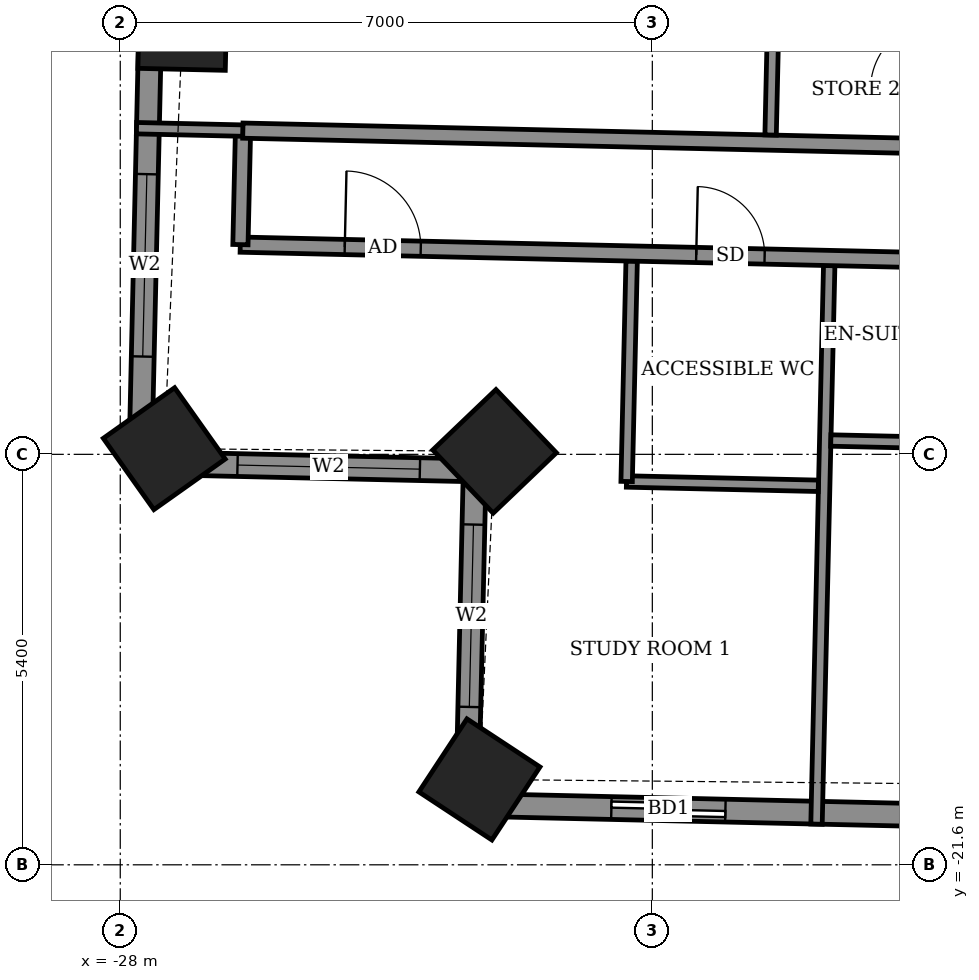
"""IFC4 building model, lengths in metres.
Left out: names, types, materials, properties, quantities, classifications, styles, units other than length and angle.
Written with IfcOpenShell. Run it as: python <this file> out.ifc"""

import sys

from ifc_helpers import new_model, si_unit, direction, frame, frame_2d, origin, origin_2d, place, context, subcontext, project, spatial, rectangle, extrude, element, fill, save


model = new_model("IFC4")
c1 = context("Model", 3, precision=1e-05, world=origin(), true_north=direction((0.0, 1.0)))
c2 = subcontext(c1, "Body", "Model", "MODEL_VIEW")
j1 = project(units=[si_unit("LENGTHUNIT", "METRE"), si_unit("PLANEANGLEUNIT", "RADIAN")], contexts=[c1])
p1 = place(None, origin())
s1 = spatial("IfcSite", under=j1, at=p1, CompositionType="ELEMENT")
p2 = place(p1, origin())
s2 = spatial("IfcBuilding", under=s1, at=p2, CompositionType="ELEMENT")
p3 = place(p2, frame((0.0, 0.0, 205.1)))
s3 = spatial("IfcBuildingStorey", under=s2, at=p3, CompositionType="ELEMENT", Elevation=205.1)
for number, where, z_axis, x_axis in (
    (1, (-27.18, -10.56, -0.55), (0.0, 0.0, 1.0), (-0.023, -1.0, 0.0)),
    (2, (-27.421, -16.125, -0.55), (0.0, 0.0, 1.0), (0.579, -0.816, 0.0)),
    (3, (-23.075, -16.161, -0.55), (0.0, 0.0, 1.0), (0.691, -0.723, 0.0)),
    (4, (-23.275, -20.477, -0.55), (0.0, 0.0, 1.0), (0.835, -0.55, 0.0)),
):
    element("IfcColumn", number, at=place(p3, frame(where, z_axis=z_axis, x_axis=x_axis)), inside=s3, PredefinedType="COLUMN", context=c2, shape_type="SweptSolid", body=[
        extrude(rectangle(XDim=1.15, YDim=1.15, at=origin_2d()), origin(), (0.0, 0.0, 1.0), 3.6),
    ])
p4 = place(p3, frame((-27.459, -4.091, 0.0), z_axis=(0.0, 0.0, 1.0), x_axis=(-0.022668325129, -0.999743040504, 0.0)))
e5 = element("IfcWall", 5, at=p4, inside=s3, PredefinedType="SOLIDWALL", context=c2, shape_type="SweptSolid", body=[
    extrude(rectangle(XDim=12.224, YDim=0.3, at=frame_2d((6.112, 0.0))), origin(), (0.0, 0.0, 1.0), 2.55),
])
p5 = place(p4, frame((2.756, 0.0, 0.0)))
e6 = element("IfcOpeningElement", 6, at=p5, cuts=e5, PredefinedType="OPENING", context=c2, shape_type="SweptSolid", body=[
    extrude(rectangle(XDim=1.5, YDim=2.4, at=frame_2d((0.75, 1.2))), frame((0.0, 0.16, 0.0), z_axis=(0.0, -1.0, 0.0), x_axis=(1.0, 0.0, 0.0)), (0.0, 0.0, 1.0), 0.32),
])
p6 = place(p4, frame((8.425, 0.0, 0.9)))
e7 = element("IfcOpeningElement", 7, at=p6, cuts=e5, PredefinedType="OPENING", context=c2, shape_type="SweptSolid", body=[
    extrude(rectangle(XDim=2.4, YDim=1.5, at=frame_2d((1.2, 0.75))), frame((0.0, 0.16, 0.0), z_axis=(0.0, -1.0, 0.0), x_axis=(1.0, 0.0, 0.0)), (0.0, 0.0, 1.0), 0.32),
])
p7 = place(p3, frame((-27.736, -16.312, 0.0), z_axis=(0.0, 0.0, 1.0), x_axis=(0.999747504193, -0.022470599878, 0.0)))
e8 = element("IfcWall", 8, at=p7, inside=s3, PredefinedType="SOLIDWALL", context=c2, shape_type="SweptSolid", body=[
    extrude(rectangle(XDim=4.4, YDim=0.3, at=frame_2d((2.2, 0.0))), origin(), (0.0, 0.0, 1.0), 2.55),
])
p8 = place(p7, frame((1.279, 0.0, 0.9)))
e9 = element("IfcOpeningElement", 9, at=p8, cuts=e8, PredefinedType="OPENING", context=c2, shape_type="SweptSolid", body=[
    extrude(rectangle(XDim=2.4, YDim=1.5, at=frame_2d((1.2, 0.75))), frame((0.0, 0.16, 0.0), z_axis=(0.0, -1.0, 0.0), x_axis=(1.0, 0.0, 0.0)), (0.0, 0.0, 1.0), 0.32),
])
p9 = place(p3, frame((-23.337, -16.411, 0.0), z_axis=(0.0, 0.0, 1.0), x_axis=(-0.022747872013, -0.999741233679, 0.0)))
e10 = element("IfcWall", 10, at=p9, inside=s3, PredefinedType="SOLIDWALL", context=c2, shape_type="SweptSolid", body=[
    extrude(rectangle(XDim=4.4, YDim=0.3, at=frame_2d((2.2, 0.0))), origin(), (0.0, 0.0, 1.0), 2.55),
])
p10 = place(p9, frame((0.713, 0.0, 0.9)))
e11 = element("IfcOpeningElement", 11, at=p10, cuts=e10, PredefinedType="OPENING", context=c2, shape_type="SweptSolid", body=[
    extrude(rectangle(XDim=2.4, YDim=1.5, at=frame_2d((1.2, 0.75))), frame((0.0, 0.16, 0.0), z_axis=(0.0, -1.0, 0.0), x_axis=(1.0, 0.0, 0.0)), (0.0, 0.0, 1.0), 0.32),
])
p11 = place(p3, frame((-23.437, -20.81, 0.0), z_axis=(0.0, 0.0, 1.0), x_axis=(0.999742269115, -0.022702320244, 0.0)))
e12 = element("IfcWall", 12, at=p11, inside=s3, PredefinedType="SOLIDWALL", context=c2, shape_type="SweptSolid", body=[
    extrude(rectangle(XDim=41.844, YDim=0.3, at=frame_2d((20.922, 0.0))), origin(), (0.0, 0.0, 1.0), 2.55),
])
p12 = place(p11, frame((1.899, 0.0, 0.0)))
e13 = element("IfcOpeningElement", 13, at=p12, cuts=e12, PredefinedType="OPENING", context=c2, shape_type="SweptSolid", body=[
    extrude(rectangle(XDim=1.5, YDim=2.4, at=frame_2d((0.75, 1.2))), frame((0.0, 0.16, 0.0), z_axis=(0.0, -1.0, 0.0), x_axis=(1.0, 0.0, 0.0)), (0.0, 0.0, 1.0), 0.32),
])
p13 = place(p11, frame((7.575, 0.0, 0.0)))
e14 = element("IfcOpeningElement", 14, at=p13, cuts=e12, PredefinedType="OPENING", context=c2, shape_type="SweptSolid", body=[
    extrude(rectangle(XDim=1.2, YDim=2.4, at=frame_2d((0.6, 1.2))), frame((0.0, 0.16, 0.0), z_axis=(0.0, -1.0, 0.0), x_axis=(1.0, 0.0, 0.0)), (0.0, 0.0, 1.0), 0.32),
])
p14 = place(p11, frame((10.612, 0.0, 0.0)))
e15 = element("IfcOpeningElement", 15, at=p14, cuts=e12, PredefinedType="OPENING", context=c2, shape_type="SweptSolid", body=[
    extrude(rectangle(XDim=1.5, YDim=2.4, at=frame_2d((0.75, 1.2))), frame((0.0, 0.16, 0.0), z_axis=(0.0, -1.0, 0.0), x_axis=(1.0, 0.0, 0.0)), (0.0, 0.0, 1.0), 0.32),
])
p15 = place(p11, frame((15.762, 0.0, 0.0)))
e16 = element("IfcOpeningElement", 16, at=p15, cuts=e12, PredefinedType="OPENING", context=c2, shape_type="SweptSolid", body=[
    extrude(rectangle(XDim=1.5, YDim=2.4, at=frame_2d((0.75, 1.2))), frame((0.0, 0.16, 0.0), z_axis=(0.0, -1.0, 0.0), x_axis=(1.0, 0.0, 0.0)), (0.0, 0.0, 1.0), 0.32),
])
p16 = place(p11, frame((21.648, 0.0, 0.0)))
e17 = element("IfcOpeningElement", 17, at=p16, cuts=e12, PredefinedType="OPENING", context=c2, shape_type="SweptSolid", body=[
    extrude(rectangle(XDim=1.2, YDim=2.4, at=frame_2d((0.6, 1.2))), frame((0.0, 0.16, 0.0), z_axis=(0.0, -1.0, 0.0), x_axis=(1.0, 0.0, 0.0)), (0.0, 0.0, 1.0), 0.32),
])
p17 = place(p11, frame((24.685, 0.0, 0.0)))
e18 = element("IfcOpeningElement", 18, at=p17, cuts=e12, PredefinedType="OPENING", context=c2, shape_type="SweptSolid", body=[
    extrude(rectangle(XDim=1.5, YDim=2.4, at=frame_2d((0.75, 1.2))), frame((0.0, 0.16, 0.0), z_axis=(0.0, -1.0, 0.0), x_axis=(1.0, 0.0, 0.0)), (0.0, 0.0, 1.0), 0.32),
])
p18 = place(p11, frame((29.685, 0.0, 0.0)))
e19 = element("IfcOpeningElement", 19, at=p18, cuts=e12, PredefinedType="OPENING", context=c2, shape_type="SweptSolid", body=[
    extrude(rectangle(XDim=1.5, YDim=2.4, at=frame_2d((0.75, 1.2))), frame((0.0, 0.16, 0.0), z_axis=(0.0, -1.0, 0.0), x_axis=(1.0, 0.0, 0.0)), (0.0, 0.0, 1.0), 0.32),
])
p19 = place(p11, frame((33.022, 0.0, 0.0)))
e20 = element("IfcOpeningElement", 20, at=p19, cuts=e12, PredefinedType="OPENING", context=c2, shape_type="SweptSolid", body=[
    extrude(rectangle(XDim=1.2, YDim=2.4, at=frame_2d((0.6, 1.2))), frame((0.0, 0.16, 0.0), z_axis=(0.0, -1.0, 0.0), x_axis=(1.0, 0.0, 0.0)), (0.0, 0.0, 1.0), 0.32),
])
p20 = place(p11, frame((37.974, 0.0, 0.9)))
e21 = element("IfcOpeningElement", 21, at=p20, cuts=e12, PredefinedType="OPENING", context=c2, shape_type="SweptSolid", body=[
    extrude(rectangle(XDim=2.4, YDim=1.5, at=frame_2d((1.2, 0.75))), frame((0.0, 0.16, 0.0), z_axis=(0.0, -1.0, 0.0), x_axis=(1.0, 0.0, 0.0)), (0.0, 0.0, 1.0), 0.32),
])
p21 = place(p3, frame((-18.84, -21.065, 0.0), z_axis=(0.0, 0.0, 1.0), x_axis=(0.022720650804, 0.999741852694, 0.0)))
e22 = element("IfcWall", 22, at=p21, inside=s3, PredefinedType="PARTITIONING", context=c2, shape_type="SweptSolid", body=[
    extrude(rectangle(XDim=7.35, YDim=0.15, at=frame_2d((3.675, 0.0))), origin(), (0.0, 0.0, 1.0), 2.55),
])
p22 = place(p3, frame((-21.34, -16.557, 0.0), z_axis=(0.0, 0.0, 1.0), x_axis=(0.999743977673, -0.022626955293, 0.0)))
e23 = element("IfcWall", 23, at=p22, inside=s3, PredefinedType="PARTITIONING", context=c2, shape_type="SweptSolid", body=[
    extrude(rectangle(XDim=2.525, YDim=0.15, at=frame_2d((1.262, 0.0))), origin(), (0.0, 0.0, 1.0), 3.05),
])
p23 = place(p3, frame((-21.338, -16.557, 0.0), z_axis=(0.0, 0.0, 1.0), x_axis=(0.022732880677, 0.999741574676, 0.0)))
e24 = element("IfcWall", 24, at=p23, inside=s3, PredefinedType="PARTITIONING", context=c2, shape_type="SweptSolid", body=[
    extrude(rectangle(XDim=2.9, YDim=0.15, at=frame_2d((1.45, 0.0))), origin(), (0.0, 0.0, 1.0), 3.05),
])
p24 = place(p3, frame((-18.652, -16.018, 0.0), z_axis=(0.0, 0.0, 1.0), x_axis=(0.999749797124, -0.022368351553, 0.0)))
e25 = element("IfcWall", 25, at=p24, inside=s3, PredefinedType="PARTITIONING", context=c2, shape_type="SweptSolid", body=[
    extrude(rectangle(XDim=2.325, YDim=0.15, at=frame_2d((1.162, 0.0))), origin(), (0.0, 0.0, 1.0), 3.05),
])
p25 = place(p3, frame((-26.421, -13.441, 0.0), z_axis=(0.0, 0.0, 1.0), x_axis=(0.999742754064, -0.022680954485, 0.0)))
e26 = element("IfcWall", 26, at=p25, inside=s3, PredefinedType="PARTITIONING", context=c2, shape_type="SweptSolid", body=[
    extrude(rectangle(XDim=48.945, YDim=0.2, at=frame_2d((24.472, 0.0))), origin(), (0.0, 0.0, 1.0), 3.05),
])
p26 = place(p25, frame((1.375, 0.0, 0.0)))
e27 = element("IfcOpeningElement", 27, at=p26, cuts=e26, PredefinedType="OPENING", context=c2, shape_type="SweptSolid", body=[
    extrude(rectangle(XDim=1.0, YDim=2.1, at=frame_2d((0.5, 1.05))), frame((0.0, 0.11, 0.0), z_axis=(0.0, -1.0, 0.0), x_axis=(1.0, 0.0, 0.0)), (0.0, 0.0, 1.0), 0.22),
])
p27 = place(p25, frame((6.0, 0.0, 0.0)))
e28 = element("IfcOpeningElement", 28, at=p27, cuts=e26, PredefinedType="OPENING", context=c2, shape_type="SweptSolid", body=[
    extrude(rectangle(XDim=0.9, YDim=2.1, at=frame_2d((0.45, 1.05))), frame((0.0, 0.11, 0.0), z_axis=(0.0, -1.0, 0.0), x_axis=(1.0, 0.0, 0.0)), (0.0, 0.0, 1.0), 0.22),
])
p28 = place(p25, frame((10.775, 0.0, 0.0)))
e29 = element("IfcOpeningElement", 29, at=p28, cuts=e26, PredefinedType="OPENING", context=c2, shape_type="SweptSolid", body=[
    extrude(rectangle(XDim=0.9, YDim=2.1, at=frame_2d((0.45, 1.05))), frame((0.0, 0.11, 0.0), z_axis=(0.0, -1.0, 0.0), x_axis=(1.0, 0.0, 0.0)), (0.0, 0.0, 1.0), 0.22),
])
p29 = place(p25, frame((13.05, 0.0, 0.0)))
e30 = element("IfcOpeningElement", 30, at=p29, cuts=e26, PredefinedType="OPENING", context=c2, shape_type="SweptSolid", body=[
    extrude(rectangle(XDim=0.9, YDim=2.1, at=frame_2d((0.45, 1.05))), frame((0.0, 0.11, 0.0), z_axis=(0.0, -1.0, 0.0), x_axis=(1.0, 0.0, 0.0)), (0.0, 0.0, 1.0), 0.22),
])
p30 = place(p25, frame((20.275, 0.0, 0.0)))
e31 = element("IfcOpeningElement", 31, at=p30, cuts=e26, PredefinedType="OPENING", context=c2, shape_type="SweptSolid", body=[
    extrude(rectangle(XDim=0.9, YDim=2.1, at=frame_2d((0.45, 1.05))), frame((0.0, 0.11, 0.0), z_axis=(0.0, -1.0, 0.0), x_axis=(1.0, 0.0, 0.0)), (0.0, 0.0, 1.0), 0.22),
])
p31 = place(p25, frame((22.525, 0.0, 0.0)))
e32 = element("IfcOpeningElement", 32, at=p31, cuts=e26, PredefinedType="OPENING", context=c2, shape_type="SweptSolid", body=[
    extrude(rectangle(XDim=0.9, YDim=2.1, at=frame_2d((0.45, 1.05))), frame((0.0, 0.11, 0.0), z_axis=(0.0, -1.0, 0.0), x_axis=(1.0, 0.0, 0.0)), (0.0, 0.0, 1.0), 0.22),
])
p32 = place(p25, frame((29.6, 0.0, 0.0)))
e33 = element("IfcOpeningElement", 33, at=p32, cuts=e26, PredefinedType="OPENING", context=c2, shape_type="SweptSolid", body=[
    extrude(rectangle(XDim=0.9, YDim=2.1, at=frame_2d((0.45, 1.05))), frame((0.0, 0.11, 0.0), z_axis=(0.0, -1.0, 0.0), x_axis=(1.0, 0.0, 0.0)), (0.0, 0.0, 1.0), 0.22),
])
p33 = place(p25, frame((31.875, 0.0, 0.0)))
e34 = element("IfcOpeningElement", 34, at=p33, cuts=e26, PredefinedType="OPENING", context=c2, shape_type="SweptSolid", body=[
    extrude(rectangle(XDim=0.9, YDim=2.1, at=frame_2d((0.45, 1.05))), frame((0.0, 0.11, 0.0), z_axis=(0.0, -1.0, 0.0), x_axis=(1.0, 0.0, 0.0)), (0.0, 0.0, 1.0), 0.22),
])
p34 = place(p25, frame((38.85, 0.0, 0.0)))
e35 = element("IfcOpeningElement", 35, at=p34, cuts=e26, PredefinedType="OPENING", context=c2, shape_type="SweptSolid", body=[
    extrude(rectangle(XDim=0.9, YDim=2.1, at=frame_2d((0.45, 1.05))), frame((0.0, 0.11, 0.0), z_axis=(0.0, -1.0, 0.0), x_axis=(1.0, 0.0, 0.0)), (0.0, 0.0, 1.0), 0.22),
])
p35 = place(p25, frame((46.097, 0.0, 0.0)))
e36 = element("IfcOpeningElement", 36, at=p35, cuts=e26, PredefinedType="OPENING", context=c2, shape_type="SweptSolid", body=[
    extrude(rectangle(XDim=1.0, YDim=2.1, at=frame_2d((0.5, 1.05))), frame((0.0, 0.11, 0.0), z_axis=(0.0, -1.0, 0.0), x_axis=(1.0, 0.0, 0.0)), (0.0, 0.0, 1.0), 0.22),
])
p36 = place(p25, frame((41.2, 0.0, 0.0)))
e37 = element("IfcOpeningElement", 37, at=p36, cuts=e26, PredefinedType="OPENING", context=c2, shape_type="SweptSolid", body=[
    extrude(rectangle(XDim=0.9, YDim=2.1, at=frame_2d((0.45, 1.05))), frame((0.0, 0.11, 0.0), z_axis=(0.0, -1.0, 0.0), x_axis=(1.0, 0.0, 0.0)), (0.0, 0.0, 1.0), 0.22),
])
p37 = place(p3, frame((-26.419, -13.441, 0.0), z_axis=(0.0, 0.0, 1.0), x_axis=(0.022617910375, 0.999744182344, 0.0)))
e38 = element("IfcWall", 38, at=p37, inside=s3, PredefinedType="PARTITIONING", context=c2, shape_type="SweptSolid", body=[
    extrude(rectangle(XDim=1.5, YDim=0.2, at=frame_2d((0.75, 0.0))), origin(), (0.0, 0.0, 1.0), 3.05),
])
p38 = place(p3, frame((-27.786, -11.909, 0.0), z_axis=(0.0, 0.0, 1.0), x_axis=(0.999740216184, -0.022792545827, 0.0)))
e39 = element("IfcWall", 39, at=p38, inside=s3, PredefinedType="PARTITIONING", context=c2, shape_type="SweptSolid", body=[
    extrude(rectangle(XDim=1.403, YDim=0.15, at=frame_2d((0.702, 0.0))), origin(), (0.0, 0.0, 1.0), 2.55),
])
p39 = place(p3, frame((-26.387, -11.941, 0.0), z_axis=(0.0, 0.0, 1.0), x_axis=(0.999741076645, -0.022754772455, 0.0)))
e40 = element("IfcWall", 40, at=p39, inside=s3, PredefinedType="PARTITIONING", context=c2, shape_type="SweptSolid", body=[
    extrude(rectangle(XDim=9.141, YDim=0.2, at=frame_2d((4.571, 0.0))), origin(), (0.0, 0.0, 1.0), 3.05),
])
p40 = place(p3, frame((-19.444, -11.999, 0.0), z_axis=(0.0, 0.0, 1.0), x_axis=(0.022603288534, 0.999744513037, 0.0)))
e41 = element("IfcWall", 41, at=p40, inside=s3, PredefinedType="PARTITIONING", context=c2, shape_type="SweptSolid", body=[
    extrude(rectangle(XDim=2.301, YDim=0.15, at=frame_2d((1.15, 0.0))), origin(), (0.0, 0.0, 1.0), 3.05),
])
p41 = place(p6, origin())
e42 = element("IfcWindow", 42, at=p41, inside=s3, PartitioningType="DOUBLE_PANEL_VERTICAL", PredefinedType="WINDOW", context=c2, shape_type="SweptSolid", body=[
    extrude(rectangle(XDim=2.4, YDim=1.5, at=frame_2d((1.2, 0.75))), frame((0.0, 0.03, 0.0), z_axis=(0.0, -1.0, 0.0), x_axis=(1.0, 0.0, 0.0)), (0.0, 0.0, 1.0), 0.06),
])
fill(e7, e42)
p42 = place(p8, origin())
e43 = element("IfcWindow", 43, at=p42, inside=s3, PartitioningType="DOUBLE_PANEL_VERTICAL", PredefinedType="WINDOW", context=c2, shape_type="SweptSolid", body=[
    extrude(rectangle(XDim=2.4, YDim=1.5, at=frame_2d((1.2, 0.75))), frame((0.0, 0.03, 0.0), z_axis=(0.0, -1.0, 0.0), x_axis=(1.0, 0.0, 0.0)), (0.0, 0.0, 1.0), 0.06),
])
fill(e9, e43)
p43 = place(p10, origin())
e44 = element("IfcWindow", 44, at=p43, inside=s3, PartitioningType="DOUBLE_PANEL_VERTICAL", PredefinedType="WINDOW", context=c2, shape_type="SweptSolid", body=[
    extrude(rectangle(XDim=2.4, YDim=1.5, at=frame_2d((1.2, 0.75))), frame((0.0, 0.03, 0.0), z_axis=(0.0, -1.0, 0.0), x_axis=(1.0, 0.0, 0.0)), (0.0, 0.0, 1.0), 0.06),
])
fill(e11, e44)
p44 = place(p12, origin())
e45 = element("IfcDoor", 45, at=p44, inside=s3, OperationType="SLIDING_TO_LEFT", PredefinedType="DOOR", context=c2, shape_type="SweptSolid", body=[
    extrude(rectangle(XDim=1.5, YDim=2.4, at=frame_2d((0.75, 1.2))), frame((0.0, 0.025, 0.0), z_axis=(0.0, -1.0, 0.0), x_axis=(1.0, 0.0, 0.0)), (0.0, 0.0, 1.0), 0.05),
])
fill(e13, e45)
p45 = place(p26, origin())
e46 = element("IfcDoor", 46, at=p45, inside=s3, OperationType="SINGLE_SWING_LEFT", PredefinedType="DOOR", context=c2, shape_type="SweptSolid", body=[
    extrude(rectangle(XDim=1.0, YDim=2.1, at=frame_2d((0.5, 1.05))), frame((0.0, 0.025, 0.0), z_axis=(0.0, -1.0, 0.0), x_axis=(1.0, 0.0, 0.0)), (0.0, 0.0, 1.0), 0.05),
])
fill(e27, e46)
p46 = place(p27, origin())
e47 = element("IfcDoor", 47, at=p46, inside=s3, OperationType="SINGLE_SWING_LEFT", PredefinedType="DOOR", context=c2, shape_type="SweptSolid", body=[
    extrude(rectangle(XDim=0.9, YDim=2.1, at=frame_2d((0.45, 1.05))), frame((0.0, 0.025, 0.0), z_axis=(0.0, -1.0, 0.0), x_axis=(1.0, 0.0, 0.0)), (0.0, 0.0, 1.0), 0.05),
])
fill(e28, e47)
save(model, sys.argv[1])
